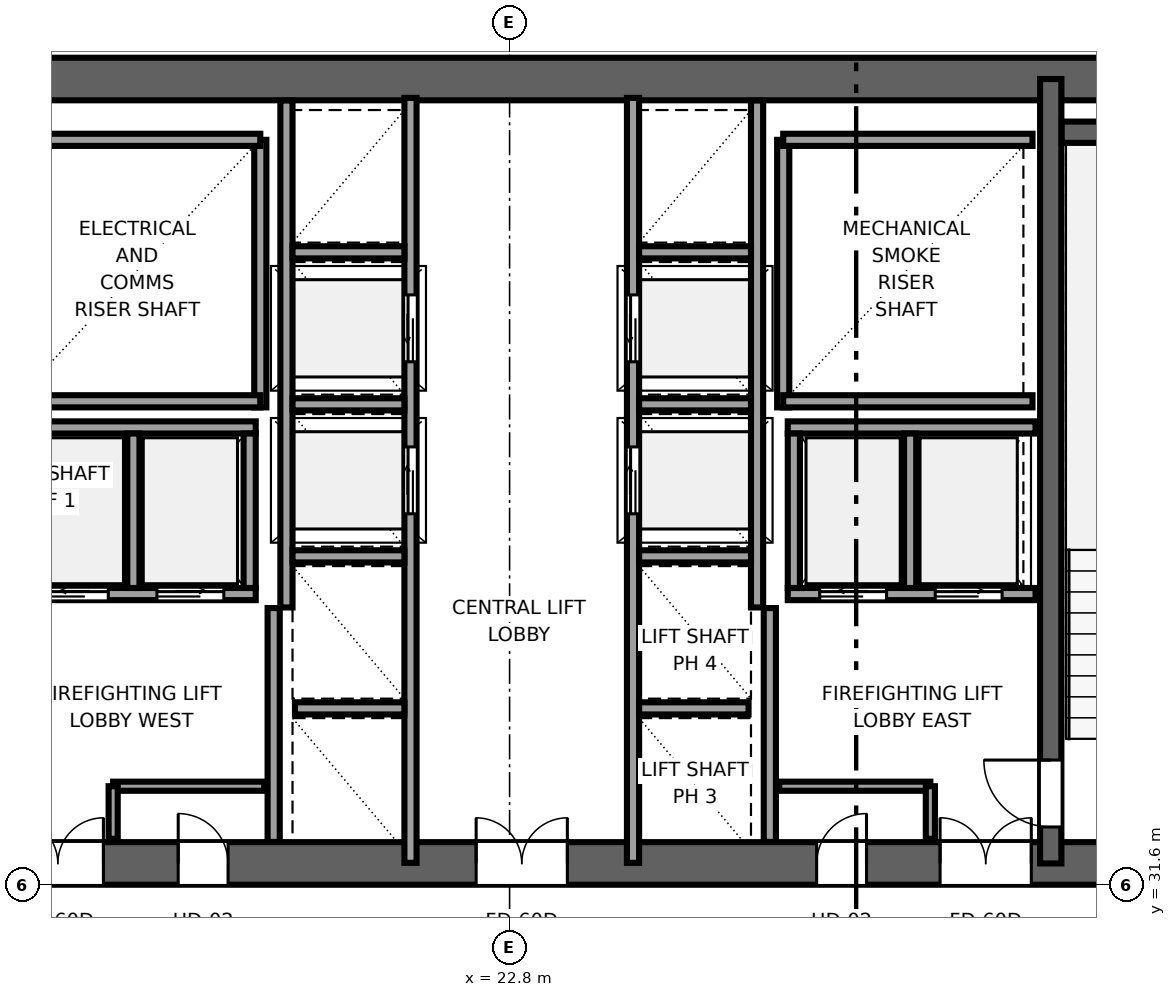
"""IFC4 building model, lengths in metres.
Left out: names, types, materials, properties, quantities, classifications, styles, units other than length and angle.
Written with IfcOpenShell. Run it as: python <this file> out.ifc"""

import sys

from ifc_helpers import new_model, si_unit, direction, frame, frame_2d, origin, place, context, subcontext, project, spatial, rectangle, extrude, source, transform, mapped, element, fill, save


model = new_model("IFC4")
c1 = context("Model", 3, precision=1e-05, world=origin(), true_north=direction((0.0, 1.0)))
c2 = subcontext(c1, "Body", "Model", "MODEL_VIEW")
j1 = project(units=[si_unit("LENGTHUNIT", "METRE"), si_unit("PLANEANGLEUNIT", "RADIAN")], contexts=[c1])
p1 = place(None, origin())
s1 = spatial("IfcSite", under=j1, at=p1, CompositionType="ELEMENT")
p2 = place(p1, origin())
s2 = spatial("IfcBuilding", under=s1, at=p2, CompositionType="ELEMENT")
p3 = place(p2, frame((0.0, 0.0, 104.45)))
s3 = spatial("IfcBuildingStorey", under=s2, at=p3, CompositionType="ELEMENT", Elevation=104.45)
p4 = place(p3, frame((9.8, 31.95, 0.0), z_axis=(0.0, 0.0, 1.0), x_axis=(1.0, 0.0, 0.0)))
e1 = element("IfcWall", 1, at=p4, inside=s3, PredefinedType="SHEAR", context=c2, shape_type="SweptSolid", body=[
    extrude(rectangle(XDim=26.4, YDim=0.7, at=frame_2d((13.2, 0.0))), origin(), (0.0, 0.0, 1.0), 3.55),
])
p5 = place(p4, frame((6.32, 0.0, 0.0), z_axis=(0.0, 0.0, 1.0), x_axis=(-1.0, 0.0, 0.0)))
e2 = element("IfcOpeningElement", 2, at=p5, cuts=e1, PredefinedType="OPENING", context=c2, shape_type="SweptSolid", body=[
    extrude(rectangle(XDim=1.5, YDim=2.04, at=frame_2d((0.75, 1.02))), frame((0.0, 0.36, 0.0), z_axis=(0.0, -1.0, 0.0), x_axis=(1.0, 0.0, 0.0)), (0.0, 0.0, 1.0), 0.72),
])
p6 = place(p4, frame((13.95, 0.0, 0.0), z_axis=(0.0, 0.0, 1.0), x_axis=(-1.0, 0.0, 0.0)))
e3 = element("IfcOpeningElement", 3, at=p6, cuts=e1, PredefinedType="OPENING", context=c2, shape_type="SweptSolid", body=[
    extrude(rectangle(XDim=1.5, YDim=2.04, at=frame_2d((0.75, 1.02))), frame((0.0, 0.36, 0.0), z_axis=(0.0, -1.0, 0.0), x_axis=(1.0, 0.0, 0.0)), (0.0, 0.0, 1.0), 0.72),
])
p7 = place(p4, frame((21.58, 0.0, 0.0), z_axis=(0.0, 0.0, 1.0), x_axis=(-1.0, 0.0, 0.0)))
e4 = element("IfcOpeningElement", 4, at=p7, cuts=e1, PredefinedType="OPENING", context=c2, shape_type="SweptSolid", body=[
    extrude(rectangle(XDim=1.5, YDim=2.04, at=frame_2d((0.75, 1.02))), frame((0.0, 0.36, 0.0), z_axis=(0.0, -1.0, 0.0), x_axis=(1.0, 0.0, 0.0)), (0.0, 0.0, 1.0), 0.72),
])
p8 = place(p4, frame((8.37, 0.0, 0.0), z_axis=(0.0, 0.0, 1.0), x_axis=(-1.0, 0.0, 0.0)))
e5 = element("IfcOpeningElement", 5, at=p8, cuts=e1, PredefinedType="OPENING", context=c2, shape_type="SweptSolid", body=[
    extrude(rectangle(XDim=0.82, YDim=2.01, at=frame_2d((0.41, 1.005))), frame((0.0, 0.36, 0.0), z_axis=(0.0, -1.0, 0.0), x_axis=(1.0, 0.0, 0.0)), (0.0, 0.0, 1.0), 0.72),
])
p9 = place(p4, frame((18.87, 0.0, 0.0), z_axis=(0.0, 0.0, 1.0), x_axis=(-1.0, 0.0, 0.0)))
e6 = element("IfcOpeningElement", 6, at=p9, cuts=e1, PredefinedType="OPENING", context=c2, shape_type="SweptSolid", body=[
    extrude(rectangle(XDim=0.82, YDim=2.01, at=frame_2d((0.41, 1.005))), frame((0.0, 0.36, 0.0), z_axis=(0.0, -1.0, 0.0), x_axis=(1.0, 0.0, 0.0)), (0.0, 0.0, 1.0), 0.72),
])
p10 = place(p3, frame((9.8, 44.85, 0.0), z_axis=(0.0, 0.0, 1.0), x_axis=(1.0, 0.0, 0.0)))
e7 = element("IfcWall", 7, at=p10, inside=s3, PredefinedType="SHEAR", context=c2, shape_type="SweptSolid", body=[
    extrude(rectangle(XDim=26.4, YDim=0.7, at=frame_2d((13.2, 0.0))), origin(), (0.0, 0.0, 1.0), 3.55),
])
p11 = place(p3, frame((31.7, 31.95, 0.0), z_axis=(0.0, 0.0, 1.0), x_axis=(0.0, 1.0, 0.0)))
e8 = element("IfcWall", 8, at=p11, inside=s3, PredefinedType="SHEAR", context=c2, shape_type="SweptSolid", body=[
    extrude(rectangle(XDim=12.9, YDim=0.35, at=frame_2d((6.45, 0.0))), origin(), (0.0, 0.0, 1.0), 3.55),
])
p12 = place(p11, frame((1.7, 0.0, 0.0), z_axis=(0.0, 0.0, 1.0), x_axis=(-1.0, 0.0, 0.0)))
e9 = element("IfcOpeningElement", 9, at=p12, cuts=e8, PredefinedType="OPENING", context=c2, shape_type="SweptSolid", body=[
    extrude(rectangle(XDim=1.1, YDim=2.12, at=frame_2d((0.55, 1.06))), frame((0.0, 0.185, 0.0), z_axis=(0.0, -1.0, 0.0), x_axis=(1.0, 0.0, 0.0)), (0.0, 0.0, 1.0), 0.37),
])
p13 = place(p3, frame((31.88, 43.975, 0.0), z_axis=(0.0, 0.0, 1.0), x_axis=(1.0, 0.0, 0.0)))
e10 = element("IfcWall", 10, at=p13, inside=s3, PredefinedType="SHEAR", context=c2, shape_type="SweptSolid", body=[
    extrude(rectangle(XDim=3.6, YDim=0.35, at=frame_2d((1.8, 0.0))), origin(), (0.0, 0.0, 1.0), 3.55),
])
p14 = place(p3, frame((18.7, 39.45, 0.0), z_axis=(0.0, 0.0, 1.0), x_axis=(0.0, 1.0, 0.0)))
e11 = element("IfcWall", 11, at=p14, inside=s3, PredefinedType="SOLIDWALL", context=c2, shape_type="SweptSolid", body=[
    extrude(rectangle(XDim=4.4, YDim=0.2, at=frame_2d((2.2, 0.0))), origin(), (0.0, 0.0, 1.0), 3.37),
])
for number, where, z_axis, x_axis in (
    (12, (14.6, 39.55, 0.0), (0.0, 0.0, 1.0), (1.0, 0.0, 0.0)),
    (13, (14.6, 43.85, 0.0), (0.0, 0.0, 1.0), (1.0, 0.0, 0.0)),
):
    element("IfcWall", number, at=place(p3, frame(where, z_axis=z_axis, x_axis=x_axis)), inside=s3, PredefinedType="SOLIDWALL", context=c2, shape_type="SweptSolid", body=[
        extrude(rectangle(XDim=4.1, YDim=0.2, at=frame_2d((2.05, 0.0))), origin(), (0.0, 0.0, 1.0), 3.37),
    ])
p15 = place(p3, frame((27.3, 39.45, 0.0), z_axis=(0.0, 0.0, 1.0), x_axis=(0.0, 1.0, 0.0)))
e14 = element("IfcWall", 14, at=p15, inside=s3, PredefinedType="SOLIDWALL", context=c2, shape_type="SweptSolid", body=[
    extrude(rectangle(XDim=4.4, YDim=0.2, at=frame_2d((2.2, 0.0))), origin(), (0.0, 0.0, 1.0), 3.37),
])
for number, where, z_axis, x_axis in (
    (15, (27.3, 39.55, 0.0), (0.0, 0.0, 1.0), (1.0, 0.0, 0.0)),
    (16, (27.3, 43.85, 0.0), (0.0, 0.0, 1.0), (1.0, 0.0, 0.0)),
):
    element("IfcWall", number, at=place(p3, frame(where, z_axis=z_axis, x_axis=x_axis)), inside=s3, PredefinedType="SOLIDWALL", context=c2, shape_type="SweptSolid", body=[
        extrude(rectangle(XDim=4.1, YDim=0.2, at=frame_2d((2.05, 0.0))), origin(), (0.0, 0.0, 1.0), 3.37),
    ])
for number, where, z_axis, x_axis in (
    (17, (18.92, 32.304, 0.0), (0.0, 0.0, 1.0), (0.0, 1.0, 0.0)),
    (18, (27.08, 32.304, 0.0), (0.0, 0.0, 1.0), (0.0, 1.0, 0.0)),
):
    element("IfcWall", number, at=place(p3, frame(where, z_axis=z_axis, x_axis=x_axis)), inside=s3, PredefinedType="SOLIDWALL", context=c2, shape_type="SweptSolid", body=[
        extrude(rectangle(XDim=3.846, YDim=0.2, at=frame_2d((1.923, 0.0))), origin(), (0.0, 0.0, 1.0), 3.37),
    ])
p16 = place(p3, frame((21.17, 31.96, 0.0), z_axis=(0.0, 0.0, 1.0), x_axis=(0.0, 1.0, 0.0)))
e19 = element("IfcWall", 19, at=p16, inside=s3, PredefinedType="SOLIDWALL", context=c2, shape_type="SweptSolid", body=[
    extrude(rectangle(XDim=12.58, YDim=0.2, at=frame_2d((6.29, 0.0))), origin(), (0.0, 0.0, 1.0), 3.37),
])
p17 = place(p16, frame((5.74, 0.0, 0.0)))
e20 = element("IfcOpeningElement", 20, at=p17, cuts=e19, PredefinedType="OPENING", context=c2, shape_type="SweptSolid", body=[
    extrude(rectangle(XDim=1.1, YDim=2.12, at=frame_2d((0.55, 1.06))), frame((0.0, 0.11, 0.0), z_axis=(0.0, -1.0, 0.0), x_axis=(1.0, 0.0, 0.0)), (0.0, 0.0, 1.0), 0.22),
])
p18 = place(p16, frame((8.24, 0.0, 0.0)))
e21 = element("IfcOpeningElement", 21, at=p18, cuts=e19, PredefinedType="OPENING", context=c2, shape_type="SweptSolid", body=[
    extrude(rectangle(XDim=1.1, YDim=2.12, at=frame_2d((0.55, 1.06))), frame((0.0, 0.11, 0.0), z_axis=(0.0, -1.0, 0.0), x_axis=(1.0, 0.0, 0.0)), (0.0, 0.0, 1.0), 0.22),
])
p19 = place(p3, frame((19.13, 36.16, 0.0), z_axis=(0.0, 0.0, 1.0), x_axis=(0.0, 1.0, 0.0)))
e22 = element("IfcWall", 22, at=p19, inside=s3, PredefinedType="SOLIDWALL", context=c2, shape_type="SweptSolid", body=[
    extrude(rectangle(XDim=8.336, YDim=0.2, at=frame_2d((4.168, 0.0))), origin(), (0.0, 0.0, 1.0), 3.37),
])
p20 = place(p3, frame((19.27, 34.5, 0.0), z_axis=(0.0, 0.0, 1.0), x_axis=(1.0, 0.0, 0.0)))
e23 = element("IfcWall", 23, at=p20, inside=s3, PredefinedType="SOLIDWALL", context=c2, shape_type="SweptSolid", body=[
    extrude(rectangle(XDim=1.8, YDim=0.2, at=frame_2d((0.9, 0.0))), origin(), (0.0, 0.0, 1.0), 3.37),
])
for number, where, z_axis, x_axis in (
    (24, (19.23, 37.0, 0.0), (0.0, 0.0, 1.0), (1.0, 0.0, 0.0)),
    (25, (19.23, 39.5, 0.0), (0.0, 0.0, 1.0), (1.0, 0.0, 0.0)),
    (26, (19.23, 42.0, 0.0), (0.0, 0.0, 1.0), (1.0, 0.0, 0.0)),
):
    element("IfcWall", number, at=place(p3, frame(where, z_axis=z_axis, x_axis=x_axis)), inside=s3, PredefinedType="SOLIDWALL", context=c2, shape_type="SweptSolid", body=[
        extrude(rectangle(XDim=1.84, YDim=0.2, at=frame_2d((0.92, 0.0))), origin(), (0.0, 0.0, 1.0), 3.37),
    ])
p21 = place(p3, frame((27.375, 36.38, 0.0), z_axis=(0.0, 0.0, 1.0), x_axis=(1.0, 0.0, 0.0)))
e27 = element("IfcWall", 27, at=p21, inside=s3, PredefinedType="SOLIDWALL", context=c2, shape_type="SweptSolid", body=[
    extrude(rectangle(XDim=4.075, YDim=0.2, at=frame_2d((2.038, 0.0))), origin(), (0.0, 0.0, 1.0), 3.37),
])
p22 = place(p21, frame((0.525, 0.0, 0.0)))
e28 = element("IfcOpeningElement", 28, at=p22, cuts=e27, PredefinedType="OPENING", context=c2, shape_type="SweptSolid", body=[
    extrude(rectangle(XDim=1.1, YDim=2.12, at=frame_2d((0.55, 1.06))), frame((0.0, 0.11, 0.0), z_axis=(0.0, -1.0, 0.0), x_axis=(1.0, 0.0, 0.0)), (0.0, 0.0, 1.0), 0.22),
])
p23 = place(p21, frame((2.425, 0.0, 0.0)))
e29 = element("IfcOpeningElement", 29, at=p23, cuts=e27, PredefinedType="OPENING", context=c2, shape_type="SweptSolid", body=[
    extrude(rectangle(XDim=1.1, YDim=2.12, at=frame_2d((0.55, 1.06))), frame((0.0, 0.11, 0.0), z_axis=(0.0, -1.0, 0.0), x_axis=(1.0, 0.0, 0.0)), (0.0, 0.0, 1.0), 0.22),
])
p24 = place(p3, frame((27.375, 39.12, 0.0), z_axis=(0.0, 0.0, 1.0), x_axis=(1.0, 0.0, 0.0)))
e30 = element("IfcWall", 30, at=p24, inside=s3, PredefinedType="SOLIDWALL", context=c2, shape_type="SweptSolid", body=[
    extrude(rectangle(XDim=4.075, YDim=0.2, at=frame_2d((2.038, 0.0))), origin(), (0.0, 0.0, 1.0), 3.37),
])
for number, where, z_axis, x_axis in (
    (31, (27.475, 36.48, 0.0), (0.0, 0.0, 1.0), (0.0, 1.0, 0.0)),
    (32, (29.387, 36.48, 0.0), (0.0, 0.0, 1.0), (0.0, 1.0, 0.0)),
):
    element("IfcWall", number, at=place(p3, frame(where, z_axis=z_axis, x_axis=x_axis)), inside=s3, PredefinedType="SOLIDWALL", context=c2, shape_type="SweptSolid", body=[
        extrude(rectangle(XDim=2.54, YDim=0.2, at=frame_2d((1.27, 0.0))), origin(), (0.0, 0.0, 1.0), 3.37),
    ])
p25 = place(p3, frame((14.55, 36.38, 0.0), z_axis=(0.0, 0.0, 1.0), x_axis=(1.0, 0.0, 0.0)))
e33 = element("IfcWall", 33, at=p25, inside=s3, PredefinedType="SOLIDWALL", context=c2, shape_type="SweptSolid", body=[
    extrude(rectangle(XDim=4.075, YDim=0.2, at=frame_2d((2.038, 0.0))), origin(), (0.0, 0.0, 1.0), 3.37),
])
p26 = place(p25, frame((0.55, 0.0, 0.0)))
e34 = element("IfcOpeningElement", 34, at=p26, cuts=e33, PredefinedType="OPENING", context=c2, shape_type="SweptSolid", body=[
    extrude(rectangle(XDim=1.1, YDim=2.12, at=frame_2d((0.55, 1.06))), frame((0.0, 0.11, 0.0), z_axis=(0.0, -1.0, 0.0), x_axis=(1.0, 0.0, 0.0)), (0.0, 0.0, 1.0), 0.22),
])
p27 = place(p25, frame((2.45, 0.0, 0.0)))
e35 = element("IfcOpeningElement", 35, at=p27, cuts=e33, PredefinedType="OPENING", context=c2, shape_type="SweptSolid", body=[
    extrude(rectangle(XDim=1.1, YDim=2.12, at=frame_2d((0.55, 1.06))), frame((0.0, 0.11, 0.0), z_axis=(0.0, -1.0, 0.0), x_axis=(1.0, 0.0, 0.0)), (0.0, 0.0, 1.0), 0.22),
])
p28 = place(p3, frame((14.55, 39.12, 0.0), z_axis=(0.0, 0.0, 1.0), x_axis=(1.0, 0.0, 0.0)))
e36 = element("IfcWall", 36, at=p28, inside=s3, PredefinedType="SOLIDWALL", context=c2, shape_type="SweptSolid", body=[
    extrude(rectangle(XDim=4.075, YDim=0.2, at=frame_2d((2.038, 0.0))), origin(), (0.0, 0.0, 1.0), 3.37),
])
for number, where, z_axis, x_axis in (
    (37, (18.525, 36.48, 0.0), (0.0, 0.0, 1.0), (0.0, 1.0, 0.0)),
    (38, (16.613, 36.48, 0.0), (0.0, 0.0, 1.0), (0.0, 1.0, 0.0)),
):
    element("IfcWall", number, at=place(p3, frame(where, z_axis=z_axis, x_axis=x_axis)), inside=s3, PredefinedType="SOLIDWALL", context=c2, shape_type="SweptSolid", body=[
        extrude(rectangle(XDim=2.54, YDim=0.2, at=frame_2d((1.27, 0.0))), origin(), (0.0, 0.0, 1.0), 3.37),
    ])
p29 = place(p3, frame((24.83, 31.96, 0.0), z_axis=(0.0, 0.0, 1.0), x_axis=(0.0, 1.0, 0.0)))
e39 = element("IfcWall", 39, at=p29, inside=s3, PredefinedType="SOLIDWALL", context=c2, shape_type="SweptSolid", body=[
    extrude(rectangle(XDim=12.58, YDim=0.2, at=frame_2d((6.29, 0.0))), origin(), (0.0, 0.0, 1.0), 3.37),
])
p30 = place(p29, frame((5.74, 0.0, 0.0)))
e40 = element("IfcOpeningElement", 40, at=p30, cuts=e39, PredefinedType="OPENING", context=c2, shape_type="SweptSolid", body=[
    extrude(rectangle(XDim=1.1, YDim=2.12, at=frame_2d((0.55, 1.06))), frame((0.0, 0.11, 0.0), z_axis=(0.0, -1.0, 0.0), x_axis=(1.0, 0.0, 0.0)), (0.0, 0.0, 1.0), 0.22),
])
p31 = place(p29, frame((8.24, 0.0, 0.0)))
e41 = element("IfcOpeningElement", 41, at=p31, cuts=e39, PredefinedType="OPENING", context=c2, shape_type="SweptSolid", body=[
    extrude(rectangle(XDim=1.1, YDim=2.12, at=frame_2d((0.55, 1.06))), frame((0.0, 0.11, 0.0), z_axis=(0.0, -1.0, 0.0), x_axis=(1.0, 0.0, 0.0)), (0.0, 0.0, 1.0), 0.22),
])
p32 = place(p3, frame((26.87, 36.16, 0.0), z_axis=(0.0, 0.0, 1.0), x_axis=(0.0, 1.0, 0.0)))
e42 = element("IfcWall", 42, at=p32, inside=s3, PredefinedType="SOLIDWALL", context=c2, shape_type="SweptSolid", body=[
    extrude(rectangle(XDim=8.336, YDim=0.2, at=frame_2d((4.168, 0.0))), origin(), (0.0, 0.0, 1.0), 3.37),
])
p33 = place(p3, frame((24.93, 34.5, 0.0), z_axis=(0.0, 0.0, 1.0), x_axis=(1.0, 0.0, 0.0)))
e43 = element("IfcWall", 43, at=p33, inside=s3, PredefinedType="SOLIDWALL", context=c2, shape_type="SweptSolid", body=[
    extrude(rectangle(XDim=1.8, YDim=0.2, at=frame_2d((0.9, 0.0))), origin(), (0.0, 0.0, 1.0), 3.37),
])
for number, where, z_axis, x_axis in (
    (44, (24.93, 37.0, 0.0), (0.0, 0.0, 1.0), (1.0, 0.0, 0.0)),
    (45, (24.93, 39.5, 0.0), (0.0, 0.0, 1.0), (1.0, 0.0, 0.0)),
    (46, (24.93, 42.0, 0.0), (0.0, 0.0, 1.0), (1.0, 0.0, 0.0)),
):
    element("IfcWall", number, at=place(p3, frame(where, z_axis=z_axis, x_axis=x_axis)), inside=s3, PredefinedType="SOLIDWALL", context=c2, shape_type="SweptSolid", body=[
        extrude(rectangle(XDim=1.84, YDim=0.2, at=frame_2d((0.92, 0.0))), origin(), (0.0, 0.0, 1.0), 3.37),
    ])
p34 = place(p3, frame((16.28, 33.22, 0.0), z_axis=(0.0, 0.0, 1.0), x_axis=(1.0, 0.0, 0.0)))
e47 = element("IfcWall", 47, at=p34, inside=s3, PredefinedType="PARTITIONING", context=c2, shape_type="SweptSolid", body=[
    extrude(rectangle(XDim=2.485, YDim=0.15, at=frame_2d((1.242, 0.0))), origin(), (0.0, 0.0, 1.0), 3.37),
])
p35 = place(p3, frame((16.28, 32.355, 0.0), z_axis=(0.0, 0.0, 1.0), x_axis=(0.0, 1.0, 0.0)))
e48 = element("IfcWall", 48, at=p35, inside=s3, PredefinedType="PARTITIONING", context=c2, shape_type="SweptSolid", body=[
    extrude(rectangle(XDim=0.865, YDim=0.15, at=frame_2d((0.433, 0.0))), origin(), (0.0, 0.0, 1.0), 3.37),
])
p36 = place(p3, frame((27.235, 33.22, 0.0), z_axis=(0.0, 0.0, 1.0), x_axis=(1.0, 0.0, 0.0)))
e49 = element("IfcWall", 49, at=p36, inside=s3, PredefinedType="PARTITIONING", context=c2, shape_type="SweptSolid", body=[
    extrude(rectangle(XDim=2.485, YDim=0.15, at=frame_2d((1.242, 0.0))), origin(), (0.0, 0.0, 1.0), 3.37),
])
p37 = place(p3, frame((29.72, 32.355, 0.0), z_axis=(0.0, 0.0, 1.0), x_axis=(0.0, 1.0, 0.0)))
e50 = element("IfcWall", 50, at=p37, inside=s3, PredefinedType="PARTITIONING", context=c2, shape_type="SweptSolid", body=[
    extrude(rectangle(XDim=0.865, YDim=0.15, at=frame_2d((0.433, 0.0))), origin(), (0.0, 0.0, 1.0), 3.37),
])
m1 = source(origin(), c2, "Body", "SweptSolid", [
    extrude(rectangle(XDim=1.1, YDim=2.12, at=frame_2d((0.55, 1.06))), frame((0.0, 0.025, 0.0), z_axis=(0.0, -1.0, 0.0), x_axis=(1.0, 0.0, 0.0)), (0.0, 0.0, 1.0), 0.05),
])
p38 = place(p12, origin())
e51 = element("IfcDoor", 51, at=p38, inside=s3, OperationType="SINGLE_SWING_RIGHT", PredefinedType="DOOR", context=c2, shape_type="MappedRepresentation", body=[
    mapped(m1, transform((0.0, 0.0, 0.0), x_axis=(1.0, 0.0, 0.0), y_axis=(0.0, 1.0, 0.0), z_axis=(0.0, 0.0, 1.0), scale=1.0)),
])
fill(e9, e51)
m2 = source(origin(), c2, "Body", "SweptSolid", [
    extrude(rectangle(XDim=1.5, YDim=2.04, at=frame_2d((0.75, 1.02))), frame((0.0, 0.025, 0.0), z_axis=(0.0, -1.0, 0.0), x_axis=(1.0, 0.0, 0.0)), (0.0, 0.0, 1.0), 0.05),
])
p39 = place(p5, origin())
e52 = element("IfcDoor", 52, at=p39, inside=s3, OperationType="DOUBLE_DOOR_SINGLE_SWING", PredefinedType="DOOR", context=c2, shape_type="MappedRepresentation", body=[
    mapped(m2, transform((0.0, 0.0, 0.0), x_axis=(1.0, 0.0, 0.0), y_axis=(0.0, 1.0, 0.0), z_axis=(0.0, 0.0, 1.0), scale=1.0)),
])
fill(e2, e52)
p40 = place(p6, origin())
e53 = element("IfcDoor", 53, at=p40, inside=s3, OperationType="DOUBLE_DOOR_SINGLE_SWING", PredefinedType="DOOR", context=c2, shape_type="MappedRepresentation", body=[
    mapped(m2, transform((0.0, 0.0, 0.0), x_axis=(1.0, 0.0, 0.0), y_axis=(0.0, 1.0, 0.0), z_axis=(0.0, 0.0, 1.0), scale=1.0)),
])
fill(e3, e53)
p41 = place(p7, origin())
e54 = element("IfcDoor", 54, at=p41, inside=s3, OperationType="DOUBLE_DOOR_SINGLE_SWING", PredefinedType="DOOR", context=c2, shape_type="MappedRepresentation", body=[
    mapped(m2, transform((0.0, 0.0, 0.0), x_axis=(1.0, 0.0, 0.0), y_axis=(0.0, 1.0, 0.0), z_axis=(0.0, 0.0, 1.0), scale=1.0)),
])
fill(e4, e54)
m3 = source(origin(), c2, "Body", "SweptSolid", [
    extrude(rectangle(XDim=0.82, YDim=2.01, at=frame_2d((0.41, 1.005))), frame((0.0, 0.025, 0.0), z_axis=(0.0, -1.0, 0.0), x_axis=(1.0, 0.0, 0.0)), (0.0, 0.0, 1.0), 0.05),
])
p42 = place(p8, origin())
e55 = element("IfcDoor", 55, at=p42, inside=s3, OperationType="SINGLE_SWING_LEFT", PredefinedType="DOOR", context=c2, shape_type="MappedRepresentation", body=[
    mapped(m3, transform((0.0, 0.0, 0.0), x_axis=(1.0, 0.0, 0.0), y_axis=(0.0, 1.0, 0.0), z_axis=(0.0, 0.0, 1.0), scale=1.0)),
])
fill(e5, e55)
p43 = place(p9, origin())
e56 = element("IfcDoor", 56, at=p43, inside=s3, OperationType="SINGLE_SWING_RIGHT", PredefinedType="DOOR", context=c2, shape_type="MappedRepresentation", body=[
    mapped(m3, transform((0.0, 0.0, 0.0), x_axis=(1.0, 0.0, 0.0), y_axis=(0.0, 1.0, 0.0), z_axis=(0.0, 0.0, 1.0), scale=1.0)),
])
fill(e6, e56)
m4 = source(origin(), c2, "Body", "SweptSolid", [
    extrude(rectangle(XDim=1.1, YDim=2.12, at=frame_2d((0.55, 1.06))), frame((0.0, 0.025, 0.0), z_axis=(0.0, -1.0, 0.0), x_axis=(1.0, 0.0, 0.0)), (0.0, 0.0, 1.0), 0.05),
])
p44 = place(p17, origin())
e57 = element("IfcDoor", 57, at=p44, inside=s3, OperationType="SLIDING_TO_RIGHT", PredefinedType="DOOR", context=c2, shape_type="MappedRepresentation", body=[
    mapped(m4, transform((0.0, 0.0, 0.0), x_axis=(1.0, 0.0, 0.0), y_axis=(0.0, 1.0, 0.0), z_axis=(0.0, 0.0, 1.0), scale=1.0)),
])
fill(e20, e57)
p45 = place(p18, origin())
e58 = element("IfcDoor", 58, at=p45, inside=s3, OperationType="SLIDING_TO_LEFT", PredefinedType="DOOR", context=c2, shape_type="MappedRepresentation", body=[
    mapped(m4, transform((0.0, 0.0, 0.0), x_axis=(1.0, 0.0, 0.0), y_axis=(0.0, 1.0, 0.0), z_axis=(0.0, 0.0, 1.0), scale=1.0)),
])
fill(e21, e58)
p46 = place(p22, origin())
e59 = element("IfcDoor", 59, at=p46, inside=s3, OperationType="SLIDING_TO_LEFT", PredefinedType="DOOR", context=c2, shape_type="MappedRepresentation", body=[
    mapped(m4, transform((0.0, 0.0, 0.0), x_axis=(1.0, 0.0, 0.0), y_axis=(0.0, 1.0, 0.0), z_axis=(0.0, 0.0, 1.0), scale=1.0)),
])
fill(e28, e59)
p47 = place(p23, origin())
e60 = element("IfcDoor", 60, at=p47, inside=s3, OperationType="SLIDING_TO_RIGHT", PredefinedType="DOOR", context=c2, shape_type="MappedRepresentation", body=[
    mapped(m4, transform((0.0, 0.0, 0.0), x_axis=(1.0, 0.0, 0.0), y_axis=(0.0, 1.0, 0.0), z_axis=(0.0, 0.0, 1.0), scale=1.0)),
])
fill(e29, e60)
p48 = place(p26, origin())
e61 = element("IfcDoor", 61, at=p48, inside=s3, OperationType="SLIDING_TO_LEFT", PredefinedType="DOOR", context=c2, shape_type="MappedRepresentation", body=[
    mapped(m4, transform((0.0, 0.0, 0.0), x_axis=(1.0, 0.0, 0.0), y_axis=(0.0, 1.0, 0.0), z_axis=(0.0, 0.0, 1.0), scale=1.0)),
])
fill(e34, e61)
p49 = place(p27, origin())
e62 = element("IfcDoor", 62, at=p49, inside=s3, OperationType="SLIDING_TO_RIGHT", PredefinedType="DOOR", context=c2, shape_type="MappedRepresentation", body=[
    mapped(m4, transform((0.0, 0.0, 0.0), x_axis=(1.0, 0.0, 0.0), y_axis=(0.0, 1.0, 0.0), z_axis=(0.0, 0.0, 1.0), scale=1.0)),
])
fill(e35, e62)
p50 = place(p30, origin())
e63 = element("IfcDoor", 63, at=p50, inside=s3, OperationType="SLIDING_TO_RIGHT", PredefinedType="DOOR", context=c2, shape_type="MappedRepresentation", body=[
    mapped(m4, transform((0.0, 0.0, 0.0), x_axis=(1.0, 0.0, 0.0), y_axis=(0.0, 1.0, 0.0), z_axis=(0.0, 0.0, 1.0), scale=1.0)),
])
fill(e40, e63)
p51 = place(p31, origin())
e64 = element("IfcDoor", 64, at=p51, inside=s3, OperationType="SLIDING_TO_LEFT", PredefinedType="DOOR", context=c2, shape_type="MappedRepresentation", body=[
    mapped(m4, transform((0.0, 0.0, 0.0), x_axis=(1.0, 0.0, 0.0), y_axis=(0.0, 1.0, 0.0), z_axis=(0.0, 0.0, 1.0), scale=1.0)),
])
fill(e41, e64)
save(model, sys.argv[1])
